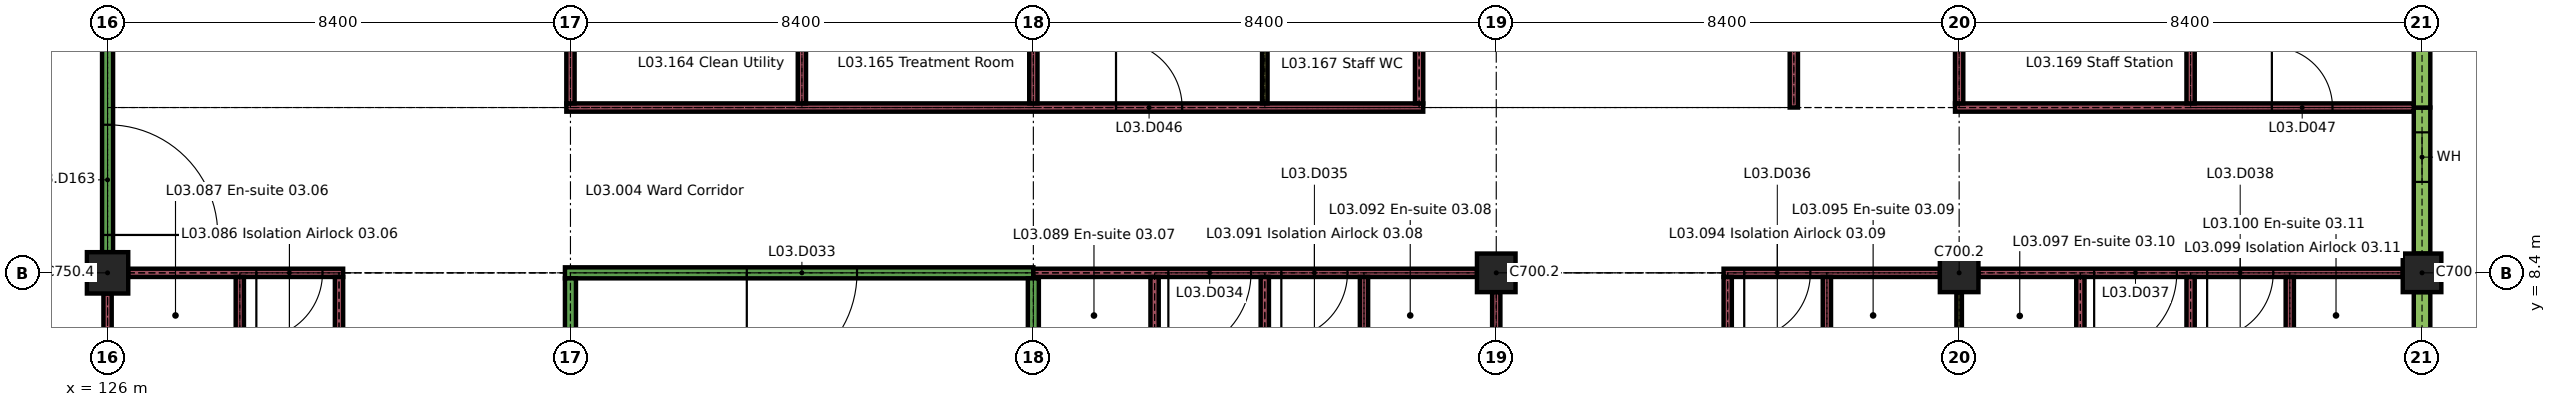
"""IFC4 building model, lengths in metres.
Left out: names, types, materials, properties, quantities, classifications, styles, units other than length and angle.
Written with IfcOpenShell. Run it as: python <this file> out.ifc"""

import sys

from ifc_helpers import new_model, si_unit, direction, frame, frame_2d, origin, origin_2d, place, context, subcontext, project, spatial, rectangle, extrude, element, fill, save


model = new_model("IFC4")
c1 = context("Model", 3, precision=1e-05, world=origin(), true_north=direction((0.0, 1.0)))
c2 = subcontext(c1, "Body", "Model", "MODEL_VIEW")
j1 = project(units=[si_unit("LENGTHUNIT", "METRE"), si_unit("PLANEANGLEUNIT", "RADIAN")], contexts=[c1])
p1 = place(None, origin())
s1 = spatial("IfcSite", under=j1, at=p1, CompositionType="ELEMENT")
p2 = place(p1, origin())
s2 = spatial("IfcBuilding", under=s1, at=p2, CompositionType="ELEMENT")
p3 = place(p2, frame((0.0, 0.0, 15.3)))
s3 = spatial("IfcBuildingStorey", under=s2, at=p3, CompositionType="ELEMENT", Elevation=15.3)
p4 = place(p3, frame((126.0, 8.4, 0.0), z_axis=(0.0, 0.0, 1.0), x_axis=(1.0, 0.0, 0.0)))
e1 = element("IfcColumn", 1, at=p4, inside=s3, PredefinedType="COLUMN", context=c2, shape_type="SweptSolid", body=[
    extrude(rectangle(XDim=0.75, YDim=0.75, at=origin_2d()), origin(), (0.0, 0.0, 1.0), 3.26),
])
for number, where, z_axis, x_axis in (
    (2, (151.2, 8.4, 0.0), (0.0, 0.0, 1.0), (1.0, 0.0, 0.0)),
    (3, (159.6, 8.4, 0.0), (0.0, 0.0, 1.0), (1.0, 0.0, 0.0)),
    (4, (168.0, 8.4, 0.0), (0.0, 0.0, 1.0), (1.0, 0.0, 0.0)),
):
    element("IfcColumn", number, at=place(p3, frame(where, z_axis=z_axis, x_axis=x_axis)), inside=s3, PredefinedType="COLUMN", context=c2, shape_type="SweptSolid", body=[
        extrude(rectangle(XDim=0.7, YDim=0.7, at=origin_2d()), origin(), (0.0, 0.0, 1.0), 3.26),
    ])
p5 = place(p3, frame((168.0, 6.0, 0.0), z_axis=(0.0, 0.0, 1.0), x_axis=(0.0, 1.0, 0.0)))
e5 = element("IfcWall", 5, at=p5, inside=s3, PredefinedType="SOLIDWALL", context=c2, shape_type="SweptSolid", body=[
    extrude(rectangle(XDim=2.05, YDim=0.3, at=frame_2d((1.025, 0.0))), origin(), (0.0, 0.0, 1.0), 2.96),
])
p6 = place(p3, frame((168.0, 8.75, 0.0), z_axis=(0.0, 0.0, 1.0), x_axis=(0.0, 1.0, 0.0)))
e6 = element("IfcWall", 6, at=p6, inside=s3, PredefinedType="SOLIDWALL", context=c2, shape_type="SweptSolid", body=[
    extrude(rectangle(XDim=2.65, YDim=0.3, at=frame_2d((1.325, 0.0))), origin(), (0.0, 0.0, 1.0), 2.96),
])
p7 = place(p6, frame((1.3, 0.0, 0.9)))
e7 = element("IfcOpeningElement", 7, at=p7, cuts=e6, PredefinedType="OPENING", context=c2, shape_type="SweptSolid", body=[
    extrude(rectangle(XDim=0.9, YDim=1.5, at=frame_2d((0.45, 0.75))), frame((0.0, 0.16, 0.0), z_axis=(0.0, -1.0, 0.0), x_axis=(1.0, 0.0, 0.0)), (0.0, 0.0, 1.0), 0.32),
])
p8 = place(p3, frame((168.0, 11.4, 0.0), z_axis=(0.0, 0.0, 1.0), x_axis=(0.0, 1.0, 0.0)))
e8 = element("IfcWall", 8, at=p8, inside=s3, PredefinedType="SOLIDWALL", context=c2, shape_type="SweptSolid", body=[
    extrude(rectangle(XDim=2.4, YDim=0.3, at=frame_2d((1.2, 0.0))), origin(), (0.0, 0.0, 1.0), 2.96),
])
p9 = place(p3, frame((126.375, 8.4, 0.0), z_axis=(0.0, 0.0, 1.0), x_axis=(1.0, 0.0, 0.0)))
e9 = element("IfcWall", 9, at=p9, inside=s3, PredefinedType="PARTITIONING", context=c2, shape_type="SweptSolid", body=[
    extrude(rectangle(XDim=3.9, YDim=0.15, at=frame_2d((1.95, 0.0))), origin(), (0.0, 0.0, 1.0), 3.26),
])
p10 = place(p9, frame((2.325, 0.0, 0.0)))
e10 = element("IfcOpeningElement", 10, at=p10, cuts=e9, PredefinedType="OPENING", context=c2, shape_type="SweptSolid", body=[
    extrude(rectangle(XDim=1.2, YDim=2.1, at=frame_2d((0.6, 1.05))), frame((0.0, 0.085, 0.0), z_axis=(0.0, -1.0, 0.0), x_axis=(1.0, 0.0, 0.0)), (0.0, 0.0, 1.0), 0.17),
])
p11 = place(p3, frame((134.3, 8.4, 0.0), z_axis=(0.0, 0.0, 1.0), x_axis=(1.0, 0.0, 0.0)))
e11 = element("IfcWall", 11, at=p11, inside=s3, PredefinedType="PARTITIONING", context=c2, shape_type="SweptSolid", body=[
    extrude(rectangle(XDim=8.5, YDim=0.2, at=frame_2d((4.25, 0.0))), origin(), (0.0, 0.0, 1.0), 3.26),
])
p12 = place(p11, frame((3.3, 0.0, 0.0)))
e12 = element("IfcOpeningElement", 12, at=p12, cuts=e11, PredefinedType="OPENING", context=c2, shape_type="SweptSolid", body=[
    extrude(rectangle(XDim=2.0, YDim=2.4, at=frame_2d((1.0, 1.2))), frame((0.0, 0.11, 0.0), z_axis=(0.0, -1.0, 0.0), x_axis=(1.0, 0.0, 0.0)), (0.0, 0.0, 1.0), 0.22),
])
p13 = place(p3, frame((142.8, 8.4, 0.0), z_axis=(0.0, 0.0, 1.0), x_axis=(1.0, 0.0, 0.0)))
e13 = element("IfcWall", 13, at=p13, inside=s3, PredefinedType="PARTITIONING", context=c2, shape_type="SweptSolid", body=[
    extrude(rectangle(XDim=8.05, YDim=0.15, at=frame_2d((4.025, 0.0))), origin(), (0.0, 0.0, 1.0), 3.26),
])
p14 = place(p13, frame((2.45, 0.0, 0.0)))
e14 = element("IfcOpeningElement", 14, at=p14, cuts=e13, PredefinedType="OPENING", context=c2, shape_type="SweptSolid", body=[
    extrude(rectangle(XDim=1.5, YDim=2.4, at=frame_2d((0.75, 1.2))), frame((0.0, 0.085, 0.0), z_axis=(0.0, -1.0, 0.0), x_axis=(1.0, 0.0, 0.0)), (0.0, 0.0, 1.0), 0.17),
])
p15 = place(p13, frame((4.5, 0.0, 0.0)))
e15 = element("IfcOpeningElement", 15, at=p15, cuts=e13, PredefinedType="OPENING", context=c2, shape_type="SweptSolid", body=[
    extrude(rectangle(XDim=1.2, YDim=2.1, at=frame_2d((0.6, 1.05))), frame((0.0, 0.085, 0.0), z_axis=(0.0, -1.0, 0.0), x_axis=(1.0, 0.0, 0.0)), (0.0, 0.0, 1.0), 0.17),
])
p16 = place(p3, frame((155.325, 8.4, 0.0), z_axis=(0.0, 0.0, 1.0), x_axis=(1.0, 0.0, 0.0)))
e16 = element("IfcWall", 16, at=p16, inside=s3, PredefinedType="PARTITIONING", context=c2, shape_type="SweptSolid", body=[
    extrude(rectangle(XDim=3.925, YDim=0.15, at=frame_2d((1.962, 0.0))), origin(), (0.0, 0.0, 1.0), 3.26),
])
p17 = place(p16, frame((0.375, 0.0, 0.0)))
e17 = element("IfcOpeningElement", 17, at=p17, cuts=e16, PredefinedType="OPENING", context=c2, shape_type="SweptSolid", body=[
    extrude(rectangle(XDim=1.2, YDim=2.1, at=frame_2d((0.6, 1.05))), frame((0.0, 0.085, 0.0), z_axis=(0.0, -1.0, 0.0), x_axis=(1.0, 0.0, 0.0)), (0.0, 0.0, 1.0), 0.17),
])
p18 = place(p3, frame((159.95, 8.4, 0.0), z_axis=(0.0, 0.0, 1.0), x_axis=(1.0, 0.0, 0.0)))
e18 = element("IfcWall", 18, at=p18, inside=s3, PredefinedType="PARTITIONING", context=c2, shape_type="SweptSolid", body=[
    extrude(rectangle(XDim=7.7, YDim=0.15, at=frame_2d((3.85, 0.0))), origin(), (0.0, 0.0, 1.0), 3.26),
])
p19 = place(p18, frame((2.1, 0.0, 0.0)))
e19 = element("IfcOpeningElement", 19, at=p19, cuts=e18, PredefinedType="OPENING", context=c2, shape_type="SweptSolid", body=[
    extrude(rectangle(XDim=1.5, YDim=2.4, at=frame_2d((0.75, 1.2))), frame((0.0, 0.085, 0.0), z_axis=(0.0, -1.0, 0.0), x_axis=(1.0, 0.0, 0.0)), (0.0, 0.0, 1.0), 0.17),
])
p20 = place(p18, frame((4.15, 0.0, 0.0)))
e20 = element("IfcOpeningElement", 20, at=p20, cuts=e18, PredefinedType="OPENING", context=c2, shape_type="SweptSolid", body=[
    extrude(rectangle(XDim=1.2, YDim=2.1, at=frame_2d((0.6, 1.05))), frame((0.0, 0.085, 0.0), z_axis=(0.0, -1.0, 0.0), x_axis=(1.0, 0.0, 0.0)), (0.0, 0.0, 1.0), 0.17),
])
p21 = place(p3, frame((134.325, 11.4, 0.0), z_axis=(0.0, 0.0, 1.0), x_axis=(1.0, 0.0, 0.0)))
e21 = element("IfcWall", 21, at=p21, inside=s3, PredefinedType="PARTITIONING", context=c2, shape_type="SweptSolid", body=[
    extrude(rectangle(XDim=15.55, YDim=0.15, at=frame_2d((7.775, 0.0))), origin(), (0.0, 0.0, 1.0), 3.26),
])
p22 = place(p21, frame((9.975, 0.0, 0.0)))
e22 = element("IfcOpeningElement", 22, at=p22, cuts=e21, PredefinedType="OPENING", context=c2, shape_type="SweptSolid", body=[
    extrude(rectangle(XDim=1.2, YDim=2.1, at=frame_2d((0.6, 1.05))), frame((0.0, 0.085, 0.0), z_axis=(0.0, -1.0, 0.0), x_axis=(1.0, 0.0, 0.0)), (0.0, 0.0, 1.0), 0.17),
])
p23 = place(p3, frame((159.525, 11.4, 0.0), z_axis=(0.0, 0.0, 1.0), x_axis=(1.0, 0.0, 0.0)))
e23 = element("IfcWall", 23, at=p23, inside=s3, PredefinedType="PARTITIONING", context=c2, shape_type="SweptSolid", body=[
    extrude(rectangle(XDim=8.325, YDim=0.15, at=frame_2d((4.163, 0.0))), origin(), (0.0, 0.0, 1.0), 3.26),
])
p24 = place(p23, frame((5.75, 0.0, 0.0)))
e24 = element("IfcOpeningElement", 24, at=p24, cuts=e23, PredefinedType="OPENING", context=c2, shape_type="SweptSolid", body=[
    extrude(rectangle(XDim=1.1, YDim=2.1, at=frame_2d((0.55, 1.05))), frame((0.0, 0.085, 0.0), z_axis=(0.0, -1.0, 0.0), x_axis=(1.0, 0.0, 0.0)), (0.0, 0.0, 1.0), 0.17),
])
p25 = place(p3, frame((126.0, 0.375, 0.0), z_axis=(0.0, 0.0, 1.0), x_axis=(0.0, 1.0, 0.0)))
e25 = element("IfcWall", 25, at=p25, inside=s3, PredefinedType="PARTITIONING", context=c2, shape_type="SweptSolid", body=[
    extrude(rectangle(XDim=7.65, YDim=0.15, at=frame_2d((3.825, 0.0))), origin(), (0.0, 0.0, 1.0), 3.26),
])
p26 = place(p3, frame((126.0, 8.775, 0.0), z_axis=(0.0, 0.0, 1.0), x_axis=(0.0, 1.0, 0.0)))
e26 = element("IfcWall", 26, at=p26, inside=s3, PredefinedType="PARTITIONING", context=c2, shape_type="SweptSolid", body=[
    extrude(rectangle(XDim=7.925, YDim=0.2, at=frame_2d((3.962, 0.0))), origin(), (0.0, 0.0, 1.0), 3.26),
])
p27 = place(p26, frame((0.312, 0.0, 0.0)))
e27 = element("IfcOpeningElement", 27, at=p27, cuts=e26, PredefinedType="OPENING", context=c2, shape_type="SweptSolid", body=[
    extrude(rectangle(XDim=2.0, YDim=2.4, at=frame_2d((1.0, 1.2))), frame((0.0, 0.11, 0.0), z_axis=(0.0, -1.0, 0.0), x_axis=(1.0, 0.0, 0.0)), (0.0, 0.0, 1.0), 0.22),
])
p28 = place(p26, frame((5.475, 0.0, 0.0)))
e28 = element("IfcOpeningElement", 28, at=p28, cuts=e26, PredefinedType="OPENING", context=c2, shape_type="SweptSolid", body=[
    extrude(rectangle(XDim=2.0, YDim=2.4, at=frame_2d((1.0, 1.2))), frame((0.0, 0.11, 0.0), z_axis=(0.0, -1.0, 0.0), x_axis=(1.0, 0.0, 0.0)), (0.0, 0.0, 1.0), 0.22),
])
p29 = place(p3, frame((128.4, 6.075, 0.0), z_axis=(0.0, 0.0, 1.0), x_axis=(0.0, 1.0, 0.0)))
e29 = element("IfcWall", 29, at=p29, inside=s3, PredefinedType="PARTITIONING", context=c2, shape_type="SweptSolid", body=[
    extrude(rectangle(XDim=2.25, YDim=0.15, at=frame_2d((1.125, 0.0))), origin(), (0.0, 0.0, 1.0), 3.26),
])
p30 = place(p3, frame((130.2, 0.15, 0.0), z_axis=(0.0, 0.0, 1.0), x_axis=(0.0, 1.0, 0.0)))
e30 = element("IfcWall", 30, at=p30, inside=s3, PredefinedType="PARTITIONING", context=c2, shape_type="SweptSolid", body=[
    extrude(rectangle(XDim=8.175, YDim=0.15, at=frame_2d((4.087, 0.0))), origin(), (0.0, 0.0, 1.0), 3.26),
])
p31 = place(p3, frame((134.4, 3.6, 0.0), z_axis=(0.0, 0.0, 1.0), x_axis=(0.0, 1.0, 0.0)))
e31 = element("IfcWall", 31, at=p31, inside=s3, PredefinedType="PARTITIONING", context=c2, shape_type="SweptSolid", body=[
    extrude(rectangle(XDim=4.7, YDim=0.2, at=frame_2d((2.35, 0.0))), origin(), (0.0, 0.0, 1.0), 3.26),
])
for number, where, z_axis, x_axis in (
    (32, (134.4, 11.475, 0.0), (0.0, 0.0, 1.0), (0.0, 1.0, 0.0)),
    (33, (138.6, 11.475, 0.0), (0.0, 0.0, 1.0), (0.0, 1.0, 0.0)),
):
    element("IfcWall", number, at=place(p3, frame(where, z_axis=z_axis, x_axis=x_axis)), inside=s3, PredefinedType="PARTITIONING", context=c2, shape_type="SweptSolid", body=[
        extrude(rectangle(XDim=2.25, YDim=0.15, at=frame_2d((1.125, 0.0))), origin(), (0.0, 0.0, 1.0), 3.26),
    ])
p32 = place(p3, frame((142.8, 3.6, 0.0), z_axis=(0.0, 0.0, 1.0), x_axis=(0.0, 1.0, 0.0)))
e34 = element("IfcWall", 34, at=p32, inside=s3, PredefinedType="PARTITIONING", context=c2, shape_type="SweptSolid", body=[
    extrude(rectangle(XDim=4.7, YDim=0.2, at=frame_2d((2.35, 0.0))), origin(), (0.0, 0.0, 1.0), 3.26),
])
for number, where, z_axis, x_axis in (
    (35, (142.8, 11.475, 0.0), (0.0, 0.0, 1.0), (0.0, 1.0, 0.0)),
    (36, (145.0, 6.075, 0.0), (0.0, 0.0, 1.0), (0.0, 1.0, 0.0)),
):
    element("IfcWall", number, at=place(p3, frame(where, z_axis=z_axis, x_axis=x_axis)), inside=s3, PredefinedType="PARTITIONING", context=c2, shape_type="SweptSolid", body=[
        extrude(rectangle(XDim=2.25, YDim=0.15, at=frame_2d((1.125, 0.0))), origin(), (0.0, 0.0, 1.0), 3.26),
    ])
p33 = place(p3, frame((147.0, 0.15, 0.0), z_axis=(0.0, 0.0, 1.0), x_axis=(0.0, 1.0, 0.0)))
e37 = element("IfcWall", 37, at=p33, inside=s3, PredefinedType="PARTITIONING", context=c2, shape_type="SweptSolid", body=[
    extrude(rectangle(XDim=8.175, YDim=0.15, at=frame_2d((4.087, 0.0))), origin(), (0.0, 0.0, 1.0), 3.26),
])
p34 = place(p3, frame((147.0, 11.475, 0.0), z_axis=(0.0, 0.0, 1.0), x_axis=(0.0, 1.0, 0.0)))
e38 = element("IfcWall", 38, at=p34, inside=s3, PredefinedType="PARTITIONING", context=c2, shape_type="SweptSolid", body=[
    extrude(rectangle(XDim=2.25, YDim=0.1, at=frame_2d((1.125, 0.0))), origin(), (0.0, 0.0, 1.0), 3.26),
])
for number, where, z_axis, x_axis in (
    (39, (148.8, 6.075, 0.0), (0.0, 0.0, 1.0), (0.0, 1.0, 0.0)),
    (40, (149.8, 11.475, 0.0), (0.0, 0.0, 1.0), (0.0, 1.0, 0.0)),
):
    element("IfcWall", number, at=place(p3, frame(where, z_axis=z_axis, x_axis=x_axis)), inside=s3, PredefinedType="PARTITIONING", context=c2, shape_type="SweptSolid", body=[
        extrude(rectangle(XDim=2.25, YDim=0.15, at=frame_2d((1.125, 0.0))), origin(), (0.0, 0.0, 1.0), 3.26),
    ])
p35 = place(p3, frame((151.2, 0.35, 0.0), z_axis=(0.0, 0.0, 1.0), x_axis=(0.0, 1.0, 0.0)))
e41 = element("IfcWall", 41, at=p35, inside=s3, PredefinedType="PARTITIONING", context=c2, shape_type="SweptSolid", body=[
    extrude(rectangle(XDim=7.7, YDim=0.15, at=frame_2d((3.85, 0.0))), origin(), (0.0, 0.0, 1.0), 3.26),
])
p36 = place(p3, frame((155.4, 0.15, 0.0), z_axis=(0.0, 0.0, 1.0), x_axis=(0.0, 1.0, 0.0)))
e42 = element("IfcWall", 42, at=p36, inside=s3, PredefinedType="PARTITIONING", context=c2, shape_type="SweptSolid", body=[
    extrude(rectangle(XDim=8.175, YDim=0.15, at=frame_2d((4.087, 0.0))), origin(), (0.0, 0.0, 1.0), 3.26),
])
p37 = place(p3, frame((156.6, 11.4, 0.0), z_axis=(0.0, 0.0, 1.0), x_axis=(0.0, 1.0, 0.0)))
e43 = element("IfcWall", 43, at=p37, inside=s3, PredefinedType="PARTITIONING", context=c2, shape_type="SweptSolid", body=[
    extrude(rectangle(XDim=2.325, YDim=0.15, at=frame_2d((1.163, 0.0))), origin(), (0.0, 0.0, 1.0), 3.26),
])
p38 = place(p3, frame((157.2, 6.075, 0.0), z_axis=(0.0, 0.0, 1.0), x_axis=(0.0, 1.0, 0.0)))
e44 = element("IfcWall", 44, at=p38, inside=s3, PredefinedType="PARTITIONING", context=c2, shape_type="SweptSolid", body=[
    extrude(rectangle(XDim=2.25, YDim=0.15, at=frame_2d((1.125, 0.0))), origin(), (0.0, 0.0, 1.0), 3.26),
])
p39 = place(p3, frame((159.6, 6.075, 0.0), z_axis=(0.0, 0.0, 1.0), x_axis=(0.0, 1.0, 0.0)))
e45 = element("IfcWall", 45, at=p39, inside=s3, PredefinedType="PARTITIONING", context=c2, shape_type="SweptSolid", body=[
    extrude(rectangle(XDim=1.975, YDim=0.1, at=frame_2d((0.988, 0.0))), origin(), (0.0, 0.0, 1.0), 3.26),
])
for number, where, z_axis, x_axis in (
    (46, (159.6, 11.475, 0.0), (0.0, 0.0, 1.0), (0.0, 1.0, 0.0)),
    (47, (161.8, 6.075, 0.0), (0.0, 0.0, 1.0), (0.0, 1.0, 0.0)),
):
    element("IfcWall", number, at=place(p3, frame(where, z_axis=z_axis, x_axis=x_axis)), inside=s3, PredefinedType="PARTITIONING", context=c2, shape_type="SweptSolid", body=[
        extrude(rectangle(XDim=2.25, YDim=0.15, at=frame_2d((1.125, 0.0))), origin(), (0.0, 0.0, 1.0), 3.26),
    ])
p40 = place(p3, frame((163.8, 0.15, 0.0), z_axis=(0.0, 0.0, 1.0), x_axis=(0.0, 1.0, 0.0)))
e48 = element("IfcWall", 48, at=p40, inside=s3, PredefinedType="PARTITIONING", context=c2, shape_type="SweptSolid", body=[
    extrude(rectangle(XDim=8.175, YDim=0.15, at=frame_2d((4.087, 0.0))), origin(), (0.0, 0.0, 1.0), 3.26),
])
for number, where, z_axis, x_axis in (
    (49, (163.8, 11.475, 0.0), (0.0, 0.0, 1.0), (0.0, 1.0, 0.0)),
    (50, (165.6, 6.075, 0.0), (0.0, 0.0, 1.0), (0.0, 1.0, 0.0)),
):
    element("IfcWall", number, at=place(p3, frame(where, z_axis=z_axis, x_axis=x_axis)), inside=s3, PredefinedType="PARTITIONING", context=c2, shape_type="SweptSolid", body=[
        extrude(rectangle(XDim=2.25, YDim=0.15, at=frame_2d((1.125, 0.0))), origin(), (0.0, 0.0, 1.0), 3.26),
    ])
p41 = place(p7, origin())
e51 = element("IfcWindow", 51, at=p41, inside=s3, PartitioningType="SINGLE_PANEL", PredefinedType="WINDOW", context=c2, shape_type="SweptSolid", body=[
    extrude(rectangle(XDim=0.9, YDim=1.5, at=frame_2d((0.45, 0.75))), frame((0.0, 0.03, 0.0), z_axis=(0.0, -1.0, 0.0), x_axis=(1.0, 0.0, 0.0)), (0.0, 0.0, 1.0), 0.06),
])
fill(e7, e51)
p42 = place(p10, origin())
e52 = element("IfcDoor", 52, at=p42, inside=s3, OperationType="SINGLE_SWING_LEFT", PredefinedType="DOOR", context=c2, shape_type="SweptSolid", body=[
    extrude(rectangle(XDim=1.2, YDim=2.1, at=frame_2d((0.6, 1.05))), frame((0.0, 0.05, 0.0), z_axis=(0.0, -1.0, 0.0), x_axis=(1.0, 0.0, 0.0)), (0.0, 0.0, 1.0), 0.1),
])
fill(e10, e52)
p43 = place(p12, origin())
e53 = element("IfcDoor", 53, at=p43, inside=s3, OperationType="SINGLE_SWING_LEFT", PredefinedType="DOOR", context=c2, shape_type="SweptSolid", body=[
    extrude(rectangle(XDim=2.0, YDim=2.4, at=frame_2d((1.0, 1.2))), frame((0.0, 0.03, 0.0), z_axis=(0.0, -1.0, 0.0), x_axis=(1.0, 0.0, 0.0)), (0.0, 0.0, 1.0), 0.06),
])
fill(e12, e53)
p44 = place(p14, origin())
e54 = element("IfcDoor", 54, at=p44, inside=s3, OperationType="SINGLE_SWING_LEFT", PredefinedType="DOOR", context=c2, shape_type="SweptSolid", body=[
    extrude(rectangle(XDim=1.5, YDim=2.4, at=frame_2d((0.75, 1.2))), frame((0.0, 0.03, 0.0), z_axis=(0.0, -1.0, 0.0), x_axis=(1.0, 0.0, 0.0)), (0.0, 0.0, 1.0), 0.06),
])
fill(e14, e54)
p45 = place(p15, origin())
e55 = element("IfcDoor", 55, at=p45, inside=s3, OperationType="SINGLE_SWING_LEFT", PredefinedType="DOOR", context=c2, shape_type="SweptSolid", body=[
    extrude(rectangle(XDim=1.2, YDim=2.1, at=frame_2d((0.6, 1.05))), frame((0.0, 0.05, 0.0), z_axis=(0.0, -1.0, 0.0), x_axis=(1.0, 0.0, 0.0)), (0.0, 0.0, 1.0), 0.1),
])
fill(e15, e55)
p46 = place(p17, origin())
e56 = element("IfcDoor", 56, at=p46, inside=s3, OperationType="SINGLE_SWING_LEFT", PredefinedType="DOOR", context=c2, shape_type="SweptSolid", body=[
    extrude(rectangle(XDim=1.2, YDim=2.1, at=frame_2d((0.6, 1.05))), frame((0.0, 0.05, 0.0), z_axis=(0.0, -1.0, 0.0), x_axis=(1.0, 0.0, 0.0)), (0.0, 0.0, 1.0), 0.1),
])
fill(e17, e56)
p47 = place(p19, origin())
e57 = element("IfcDoor", 57, at=p47, inside=s3, OperationType="SINGLE_SWING_LEFT", PredefinedType="DOOR", context=c2, shape_type="SweptSolid", body=[
    extrude(rectangle(XDim=1.5, YDim=2.4, at=frame_2d((0.75, 1.2))), frame((0.0, 0.03, 0.0), z_axis=(0.0, -1.0, 0.0), x_axis=(1.0, 0.0, 0.0)), (0.0, 0.0, 1.0), 0.06),
])
fill(e19, e57)
p48 = place(p20, origin())
e58 = element("IfcDoor", 58, at=p48, inside=s3, OperationType="SINGLE_SWING_LEFT", PredefinedType="DOOR", context=c2, shape_type="SweptSolid", body=[
    extrude(rectangle(XDim=1.2, YDim=2.1, at=frame_2d((0.6, 1.05))), frame((0.0, 0.05, 0.0), z_axis=(0.0, -1.0, 0.0), x_axis=(1.0, 0.0, 0.0)), (0.0, 0.0, 1.0), 0.1),
])
fill(e20, e58)
p49 = place(p22, origin())
e59 = element("IfcDoor", 59, at=p49, inside=s3, OperationType="SINGLE_SWING_RIGHT", PredefinedType="DOOR", context=c2, shape_type="SweptSolid", body=[
    extrude(rectangle(XDim=1.2, YDim=2.1, at=frame_2d((0.6, 1.05))), frame((0.0, 0.025, 0.0), z_axis=(0.0, -1.0, 0.0), x_axis=(1.0, 0.0, 0.0)), (0.0, 0.0, 1.0), 0.05),
])
fill(e22, e59)
p50 = place(p24, origin())
e60 = element("IfcDoor", 60, at=p50, inside=s3, OperationType="SINGLE_SWING_RIGHT", PredefinedType="DOOR", context=c2, shape_type="SweptSolid", body=[
    extrude(rectangle(XDim=1.1, YDim=2.1, at=frame_2d((0.55, 1.05))), frame((0.0, 0.025, 0.0), z_axis=(0.0, -1.0, 0.0), x_axis=(1.0, 0.0, 0.0)), (0.0, 0.0, 1.0), 0.05),
])
fill(e24, e60)
p51 = place(p27, origin())
e61 = element("IfcDoor", 61, at=p51, inside=s3, OperationType="SINGLE_SWING_LEFT", PredefinedType="DOOR", context=c2, shape_type="SweptSolid", body=[
    extrude(rectangle(XDim=2.0, YDim=2.4, at=frame_2d((1.0, 1.2))), frame((0.0, 0.03, 0.0), z_axis=(0.0, -1.0, 0.0), x_axis=(1.0, 0.0, 0.0)), (0.0, 0.0, 1.0), 0.06),
])
fill(e27, e61)
save(model, sys.argv[1])
